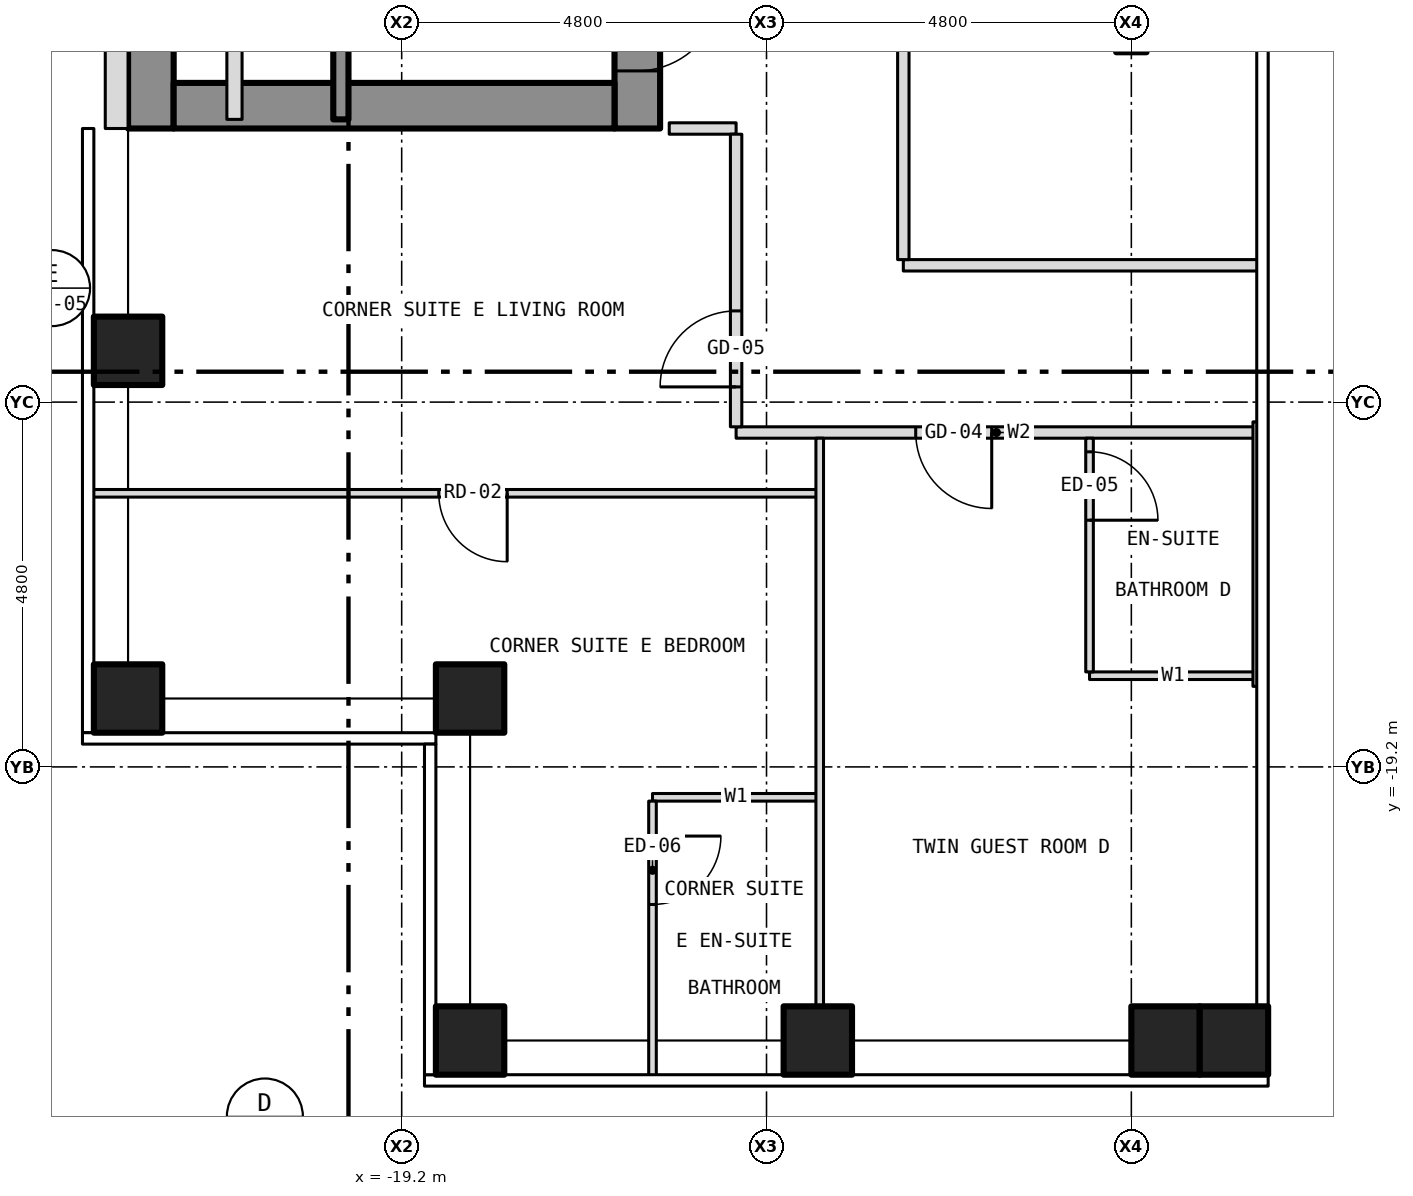
"""IFC4 building model, lengths in metres.
Left out: names, types, materials, properties, quantities, classifications, styles, units other than length and angle.
Written with IfcOpenShell. Run it as: python <this file> out.ifc"""

import sys

from ifc_helpers import new_model, si_unit, direction, frame, frame_2d, origin, origin_2d, place, context, subcontext, project, spatial, rectangle, hollow_rectangle, extrude, element, fill, save


model = new_model("IFC4")
c1 = context("Model", 3, precision=1e-05, world=origin(), true_north=direction((0.0, 1.0)))
c2 = subcontext(c1, "Body", "Model", "MODEL_VIEW")
j1 = project(units=[si_unit("LENGTHUNIT", "METRE"), si_unit("PLANEANGLEUNIT", "RADIAN")], contexts=[c1])
p1 = place(None, origin())
s1 = spatial("IfcSite", under=j1, at=p1, CompositionType="ELEMENT")
p2 = place(p1, origin())
s2 = spatial("IfcBuilding", under=s1, at=p2, CompositionType="ELEMENT")
p3 = place(p2, frame((0.0, 0.0, 120.5)))
s3 = spatial("IfcBuildingStorey", under=s2, at=p3, CompositionType="ELEMENT", Elevation=120.5)
for number, where, z_axis, x_axis in (
    (1, (-18.3, -22.8, -0.15), (0.0, 0.0, 1.0), (1.0, 0.0, 0.0)),
    (2, (-13.725, -22.8, -0.15), (0.0, 0.0, 1.0), (1.0, 0.0, 0.0)),
    (3, (-9.15, -22.8, -0.15), (0.0, 0.0, 1.0), (1.0, 0.0, 0.0)),
    (4, (-22.8, -18.3, -0.15), (0.0, 0.0, 1.0), (1.0, 0.0, 0.0)),
    (5, (-22.8, -13.725, -0.15), (0.0, 0.0, 1.0), (1.0, 0.0, 0.0)),
    (6, (-18.3, -18.3, -0.15), (0.0, 0.0, 1.0), (1.0, 0.0, 0.0)),
    (7, (-8.25, -22.8, -0.15), (0.0, 0.0, 1.0), (1.0, 0.0, 0.0)),
):
    element("IfcColumn", number, at=place(p3, frame(where, z_axis=z_axis, x_axis=x_axis)), inside=s3, PredefinedType="COLUMN", context=c2, shape_type="SweptSolid", body=[
        extrude(hollow_rectangle(XDim=0.9, YDim=0.9, WallThickness=0.05, at=origin_2d()), origin(), (0.0, 0.0, 1.0), 3.5),
    ])
p4 = place(p3, frame((-16.1, -10.8, 0.0), z_axis=(0.0, 0.0, 1.0), x_axis=(0.0, 1.0, 0.0)))
e8 = element("IfcWall", 8, at=p4, inside=s3, PredefinedType="SHEAR", context=c2, shape_type="SweptSolid", body=[
    extrude(rectangle(XDim=21.6, YDim=0.6, at=frame_2d((10.8, 0.0))), origin(), (0.0, 0.0, 1.0), 3.25),
])
p5 = place(p4, frame((9.4, 0.0, 0.0)))
e9 = element("IfcOpeningElement", 9, at=p5, cuts=e8, PredefinedType="OPENING", context=c2, shape_type="SweptSolid", body=[
    extrude(rectangle(XDim=1.1, YDim=2.1, at=frame_2d((0.55, 1.05))), frame((0.0, 0.312, 0.0), z_axis=(0.0, -1.0, 0.0), x_axis=(1.0, 0.0, 0.0)), (0.0, 0.0, 1.0), 0.624),
])
p6 = place(p4, frame((11.5, 0.0, 0.0)))
e10 = element("IfcOpeningElement", 10, at=p6, cuts=e8, PredefinedType="OPENING", context=c2, shape_type="SweptSolid", body=[
    extrude(rectangle(XDim=1.1, YDim=2.1, at=frame_2d((0.55, 1.05))), frame((0.0, 0.312, 0.0), z_axis=(0.0, -1.0, 0.0), x_axis=(1.0, 0.0, 0.0)), (0.0, 0.0, 1.0), 0.624),
])
p7 = place(p4, frame((13.6, 0.0, 0.0)))
e11 = element("IfcOpeningElement", 11, at=p7, cuts=e8, PredefinedType="OPENING", context=c2, shape_type="SweptSolid", body=[
    extrude(rectangle(XDim=1.1, YDim=2.1, at=frame_2d((0.55, 1.05))), frame((0.0, 0.312, 0.0), z_axis=(0.0, -1.0, 0.0), x_axis=(1.0, 0.0, 0.0)), (0.0, 0.0, 1.0), 0.624),
])
p8 = place(p4, frame((15.7, 0.0, 0.0)))
e12 = element("IfcOpeningElement", 12, at=p8, cuts=e8, PredefinedType="OPENING", context=c2, shape_type="SweptSolid", body=[
    extrude(rectangle(XDim=1.1, YDim=2.1, at=frame_2d((0.55, 1.05))), frame((0.0, 0.312, 0.0), z_axis=(0.0, -1.0, 0.0), x_axis=(1.0, 0.0, 0.0)), (0.0, 0.0, 1.0), 0.624),
])
p9 = place(p4, frame((17.8, 0.0, 0.0)))
e13 = element("IfcOpeningElement", 13, at=p9, cuts=e8, PredefinedType="OPENING", context=c2, shape_type="SweptSolid", body=[
    extrude(rectangle(XDim=1.1, YDim=2.1, at=frame_2d((0.55, 1.05))), frame((0.0, 0.312, 0.0), z_axis=(0.0, -1.0, 0.0), x_axis=(1.0, 0.0, 0.0)), (0.0, 0.0, 1.0), 0.624),
])
p10 = place(p4, frame((0.758, 0.0, 0.0)))
e14 = element("IfcOpeningElement", 14, at=p10, cuts=e8, PredefinedType="OPENING", context=c2, shape_type="SweptSolid", body=[
    extrude(rectangle(XDim=1.1, YDim=2.1, at=frame_2d((0.55, 1.05))), frame((0.0, 0.312, 0.0), z_axis=(0.0, -1.0, 0.0), x_axis=(1.0, 0.0, 0.0)), (0.0, 0.0, 1.0), 0.624),
])
p11 = place(p4, frame((7.5, 0.0, 0.0)))
e15 = element("IfcOpeningElement", 15, at=p11, cuts=e8, PredefinedType="OPENING", context=c2, shape_type="SweptSolid", body=[
    extrude(rectangle(XDim=1.1, YDim=2.1, at=frame_2d((0.55, 1.05))), frame((0.0, 0.312, 0.0), z_axis=(0.0, -1.0, 0.0), x_axis=(1.0, 0.0, 0.0)), (0.0, 0.0, 1.0), 0.624),
])
p12 = place(p3, frame((-22.5, -10.8, 0.0), z_axis=(0.0, 0.0, 1.0), x_axis=(0.0, 1.0, 0.0)))
e16 = element("IfcWall", 16, at=p12, inside=s3, PredefinedType="SHEAR", context=c2, shape_type="SweptSolid", body=[
    extrude(rectangle(XDim=21.6, YDim=0.6, at=frame_2d((10.8, 0.0))), origin(), (0.0, 0.0, 1.0), 3.25),
])
p13 = place(p3, frame((-22.2, -10.5, 0.0), z_axis=(0.0, 0.0, 1.0), x_axis=(1.0, 0.0, 0.0)))
e17 = element("IfcWall", 17, at=p13, inside=s3, PredefinedType="SHEAR", context=c2, shape_type="SweptSolid", body=[
    extrude(rectangle(XDim=5.8, YDim=0.6, at=frame_2d((2.9, 0.0))), origin(), (0.0, 0.0, 1.0), 3.25),
])
p14 = place(p3, frame((-22.95, 10.8, 0.0), z_axis=(0.0, 0.0, 1.0), x_axis=(0.0, -1.0, 0.0)))
e18 = element("IfcWall", 18, at=p14, inside=s3, PredefinedType="SOLIDWALL", context=c2, shape_type="SweptSolid", body=[
    extrude(rectangle(XDim=21.6, YDim=0.3, at=frame_2d((10.8, 0.0))), origin(), (0.0, 0.0, 1.0), 3.5),
])
p15 = place(p14, frame((18.05, 0.0, 1.0)))
e19 = element("IfcOpeningElement", 19, at=p15, cuts=e18, PredefinedType="OPENING", context=c2, shape_type="SweptSolid", body=[
    extrude(rectangle(XDim=0.6, YDim=1.5, at=frame_2d((0.3, 0.75))), frame((0.0, 0.162, 0.0), z_axis=(0.0, -1.0, 0.0), x_axis=(1.0, 0.0, 0.0)), (0.0, 0.0, 1.0), 0.324),
])
for number, where, z_axis, x_axis in (
    (20, (-15.9, -19.6, 0.0), (0.0, 0.0, 1.0), (1.0, 0.0, 0.0)),
    (21, (-10.15, -18.0, 0.0), (0.0, 0.0, 1.0), (1.0, 0.0, 0.0)),
):
    element("IfcWall", number, at=place(p3, frame(where, z_axis=z_axis, x_axis=x_axis)), inside=s3, PredefinedType="PARTITIONING", context=c2, shape_type="SweptSolid", body=[
        extrude(rectangle(XDim=2.2, YDim=0.1, at=frame_2d((1.1, 0.0))), origin(), (0.0, 0.0, 1.0), 3.35),
    ])
p16 = place(p3, frame((-23.28, -15.6, 0.0), z_axis=(0.0, 0.0, 1.0), x_axis=(1.0, 0.0, 0.0)))
e22 = element("IfcWall", 22, at=p16, inside=s3, PredefinedType="PARTITIONING", context=c2, shape_type="SweptSolid", body=[
    extrude(rectangle(XDim=9.58, YDim=0.1, at=frame_2d((4.79, 0.0))), origin(), (0.0, 0.0, 1.0), 3.35),
])
p17 = place(p16, frame((4.568, 0.0, 0.0)))
e23 = element("IfcOpeningElement", 23, at=p17, cuts=e22, PredefinedType="OPENING", context=c2, shape_type="SweptSolid", body=[
    extrude(rectangle(XDim=0.9, YDim=2.1, at=frame_2d((0.45, 1.05))), frame((0.0, 0.062, 0.0), z_axis=(0.0, -1.0, 0.0), x_axis=(1.0, 0.0, 0.0)), (0.0, 0.0, 1.0), 0.124),
])
p18 = place(p3, frame((-14.8, -14.8, 0.0), z_axis=(0.0, 0.0, 1.0), x_axis=(1.0, 0.0, 0.0)))
e24 = element("IfcWall", 24, at=p18, inside=s3, PredefinedType="PARTITIONING", context=c2, shape_type="SweptSolid", body=[
    extrude(rectangle(XDim=6.85, YDim=0.15, at=frame_2d((3.425, 0.0))), origin(), (0.0, 0.0, 1.0), 3.35),
])
p19 = place(p18, frame((2.363, 0.0, 0.0)))
e25 = element("IfcOpeningElement", 25, at=p19, cuts=e24, PredefinedType="OPENING", context=c2, shape_type="SweptSolid", body=[
    extrude(rectangle(XDim=1.0, YDim=2.1, at=frame_2d((0.5, 1.05))), frame((0.0, 0.087, 0.0), z_axis=(0.0, -1.0, 0.0), x_axis=(1.0, 0.0, 0.0)), (0.0, 0.0, 1.0), 0.174),
])
p20 = place(p3, frame((-12.6, -12.6, 0.0), z_axis=(0.0, 0.0, 1.0), x_axis=(1.0, 0.0, 0.0)))
e26 = element("IfcWall", 26, at=p20, inside=s3, PredefinedType="PARTITIONING", context=c2, shape_type="SweptSolid", body=[
    extrude(rectangle(XDim=4.68, YDim=0.15, at=frame_2d((2.34, 0.0))), origin(), (0.0, 0.0, 1.0), 3.35),
])
p21 = place(p3, frame((-15.68, -10.8, 0.0), z_axis=(0.0, 0.0, 1.0), x_axis=(1.0, 0.0, 0.0)))
e27 = element("IfcWall", 27, at=p21, inside=s3, PredefinedType="PARTITIONING", context=c2, shape_type="SweptSolid", body=[
    extrude(rectangle(XDim=0.88, YDim=0.15, at=frame_2d((0.44, 0.0))), origin(), (0.0, 0.0, 1.0), 3.35),
])
p22 = place(p3, frame((-21.4, -10.68, 0.0), z_axis=(0.0, 0.0, 1.0), x_axis=(0.0, 1.0, 0.0)))
e28 = element("IfcWall", 28, at=p22, inside=s3, PredefinedType="PARTITIONING", context=c2, shape_type="SweptSolid", body=[
    extrude(rectangle(XDim=8.68, YDim=0.2, at=frame_2d((4.34, 0.0))), origin(), (0.0, 0.0, 1.0), 3.25),
])
p23 = place(p22, frame((3.88, 0.0, 0.0)))
e29 = element("IfcOpeningElement", 29, at=p23, cuts=e28, PredefinedType="OPENING", context=c2, shape_type="SweptSolid", body=[
    extrude(rectangle(XDim=0.9, YDim=2.1, at=frame_2d((0.45, 1.05))), frame((0.0, 0.112, 0.0), z_axis=(0.0, -1.0, 0.0), x_axis=(1.0, 0.0, 0.0)), (0.0, 0.0, 1.0), 0.224),
])
p24 = place(p3, frame((-20.0, -10.68, 0.0), z_axis=(0.0, 0.0, 1.0), x_axis=(0.0, 1.0, 0.0)))
e30 = element("IfcWall", 30, at=p24, inside=s3, PredefinedType="SHEAR", context=c2, shape_type="SweptSolid", body=[
    extrude(rectangle(XDim=6.98, YDim=0.2, at=frame_2d((3.49, 0.0))), origin(), (0.0, 0.0, 1.0), 3.25),
])
p25 = place(p3, frame((-15.9, -23.28, 0.0), z_axis=(0.0, 0.0, 1.0), x_axis=(0.0, 1.0, 0.0)))
e31 = element("IfcWall", 31, at=p25, inside=s3, PredefinedType="PARTITIONING", context=c2, shape_type="SweptSolid", body=[
    extrude(rectangle(XDim=3.63, YDim=0.1, at=frame_2d((1.815, 0.0))), origin(), (0.0, 0.0, 1.0), 3.35),
])
p26 = place(p25, frame((2.27, 0.0, 0.0)))
e32 = element("IfcOpeningElement", 32, at=p26, cuts=e31, PredefinedType="OPENING", context=c2, shape_type="SweptSolid", body=[
    extrude(rectangle(XDim=0.9, YDim=2.1, at=frame_2d((0.45, 1.05))), frame((0.0, 0.062, 0.0), z_axis=(0.0, -1.0, 0.0), x_axis=(1.0, 0.0, 0.0)), (0.0, 0.0, 1.0), 0.124),
])
p27 = place(p3, frame((-14.8, -14.725, 0.0), z_axis=(0.0, 0.0, 1.0), x_axis=(0.0, 1.0, 0.0)))
e33 = element("IfcWall", 33, at=p27, inside=s3, PredefinedType="PARTITIONING", context=c2, shape_type="SweptSolid", body=[
    extrude(rectangle(XDim=3.85, YDim=0.15, at=frame_2d((1.925, 0.0))), origin(), (0.0, 0.0, 1.0), 3.35),
])
p28 = place(p27, frame((0.525, 0.0, 0.0)))
e34 = element("IfcOpeningElement", 34, at=p28, cuts=e33, PredefinedType="OPENING", context=c2, shape_type="SweptSolid", body=[
    extrude(rectangle(XDim=1.0, YDim=2.1, at=frame_2d((0.5, 1.05))), frame((0.0, 0.087, 0.0), z_axis=(0.0, -1.0, 0.0), x_axis=(1.0, 0.0, 0.0)), (0.0, 0.0, 1.0), 0.174),
])
p29 = place(p3, frame((-13.7, -22.68, 0.0), z_axis=(0.0, 0.0, 1.0), x_axis=(0.0, 1.0, 0.0)))
e35 = element("IfcWall", 35, at=p29, inside=s3, PredefinedType="PARTITIONING", context=c2, shape_type="SweptSolid", body=[
    extrude(rectangle(XDim=7.805, YDim=0.1, at=frame_2d((3.902, 0.0))), origin(), (0.0, 0.0, 1.0), 3.35),
])
p30 = place(p3, frame((-12.6, -12.525, 0.0), z_axis=(0.0, 0.0, 1.0), x_axis=(0.0, 1.0, 0.0)))
e36 = element("IfcWall", 36, at=p30, inside=s3, PredefinedType="PARTITIONING", context=c2, shape_type="SweptSolid", body=[
    extrude(rectangle(XDim=10.525, YDim=0.15, at=frame_2d((5.262, 0.0))), origin(), (0.0, 0.0, 1.0), 3.35),
])
p31 = place(p30, frame((4.825, 0.0, 0.0)))
e37 = element("IfcOpeningElement", 37, at=p31, cuts=e36, PredefinedType="OPENING", context=c2, shape_type="SweptSolid", body=[
    extrude(rectangle(XDim=0.9, YDim=2.1, at=frame_2d((0.45, 1.05))), frame((0.0, 0.087, 0.0), z_axis=(0.0, -1.0, 0.0), x_axis=(1.0, 0.0, 0.0)), (0.0, 0.0, 1.0), 0.174),
])
p32 = place(p3, frame((-10.15, -17.95, 0.0), z_axis=(0.0, 0.0, 1.0), x_axis=(0.0, 1.0, 0.0)))
e38 = element("IfcWall", 38, at=p32, inside=s3, PredefinedType="PARTITIONING", context=c2, shape_type="SweptSolid", body=[
    extrude(rectangle(XDim=3.075, YDim=0.1, at=frame_2d((1.538, 0.0))), origin(), (0.0, 0.0, 1.0), 3.35),
])
p33 = place(p32, frame((1.996, 0.0, 0.0)))
e39 = element("IfcOpeningElement", 39, at=p33, cuts=e38, PredefinedType="OPENING", context=c2, shape_type="SweptSolid", body=[
    extrude(rectangle(XDim=0.9, YDim=2.1, at=frame_2d((0.45, 1.05))), frame((0.0, 0.062, 0.0), z_axis=(0.0, -1.0, 0.0), x_axis=(1.0, 0.0, 0.0)), (0.0, 0.0, 1.0), 0.124),
])
p34 = place(p3, frame((-7.95, -18.14, 0.0), z_axis=(0.0, 0.0, 1.0), x_axis=(0.0, 1.0, 0.0)))
e40 = element("IfcWall", 40, at=p34, inside=s3, PredefinedType="PARTITIONING", context=c2, shape_type="SweptSolid", body=[
    extrude(rectangle(XDim=3.48, YDim=0.1, at=frame_2d((1.74, 0.0))), origin(), (0.0, 0.0, 1.0), 2.733),
])
p35 = place(p10, origin())
e41 = element("IfcDoor", 41, at=p35, inside=s3, OperationType="SINGLE_SWING_RIGHT", PredefinedType="DOOR", context=c2, shape_type="SweptSolid", body=[
    extrude(rectangle(XDim=1.1, YDim=2.1, at=frame_2d((0.55, 1.05))), frame((0.0, 0.025, 0.0), z_axis=(0.0, -1.0, 0.0), x_axis=(1.0, 0.0, 0.0)), (0.0, 0.0, 1.0), 0.05),
])
fill(e14, e41)
p36 = place(p19, origin())
e42 = element("IfcDoor", 42, at=p36, inside=s3, OperationType="SINGLE_SWING_RIGHT", PredefinedType="DOOR", context=c2, shape_type="SweptSolid", body=[
    extrude(rectangle(XDim=1.0, YDim=2.1, at=frame_2d((0.5, 1.05))), frame((0.0, 0.025, 0.0), z_axis=(0.0, -1.0, 0.0), x_axis=(1.0, 0.0, 0.0)), (0.0, 0.0, 1.0), 0.05),
])
fill(e25, e42)
p37 = place(p33, origin())
e43 = element("IfcDoor", 43, at=p37, inside=s3, OperationType="SINGLE_SWING_LEFT", PredefinedType="DOOR", context=c2, shape_type="SweptSolid", body=[
    extrude(rectangle(XDim=0.9, YDim=2.1, at=frame_2d((0.45, 1.05))), frame((0.0, 0.025, 0.0), z_axis=(0.0, -1.0, 0.0), x_axis=(1.0, 0.0, 0.0)), (0.0, 0.0, 1.0), 0.05),
])
fill(e39, e43)
p38 = place(p28, origin())
e44 = element("IfcDoor", 44, at=p38, inside=s3, OperationType="SINGLE_SWING_LEFT", PredefinedType="DOOR", context=c2, shape_type="SweptSolid", body=[
    extrude(rectangle(XDim=1.0, YDim=2.1, at=frame_2d((0.5, 1.05))), frame((0.0, 0.025, 0.0), z_axis=(0.0, -1.0, 0.0), x_axis=(1.0, 0.0, 0.0)), (0.0, 0.0, 1.0), 0.05),
])
fill(e34, e44)
p39 = place(p17, origin())
e45 = element("IfcDoor", 45, at=p39, inside=s3, OperationType="SINGLE_SWING_RIGHT", PredefinedType="DOOR", context=c2, shape_type="SweptSolid", body=[
    extrude(rectangle(XDim=0.9, YDim=2.1, at=frame_2d((0.45, 1.05))), frame((0.0, 0.025, 0.0), z_axis=(0.0, -1.0, 0.0), x_axis=(1.0, 0.0, 0.0)), (0.0, 0.0, 1.0), 0.05),
])
fill(e23, e45)
p40 = place(p26, origin())
e46 = element("IfcDoor", 46, at=p40, inside=s3, OperationType="SINGLE_SWING_RIGHT", PredefinedType="DOOR", context=c2, shape_type="SweptSolid", body=[
    extrude(rectangle(XDim=0.9, YDim=2.1, at=frame_2d((0.45, 1.05))), frame((0.0, 0.025, 0.0), z_axis=(0.0, -1.0, 0.0), x_axis=(1.0, 0.0, 0.0)), (0.0, 0.0, 1.0), 0.05),
])
fill(e32, e46)
save(model, sys.argv[1])
